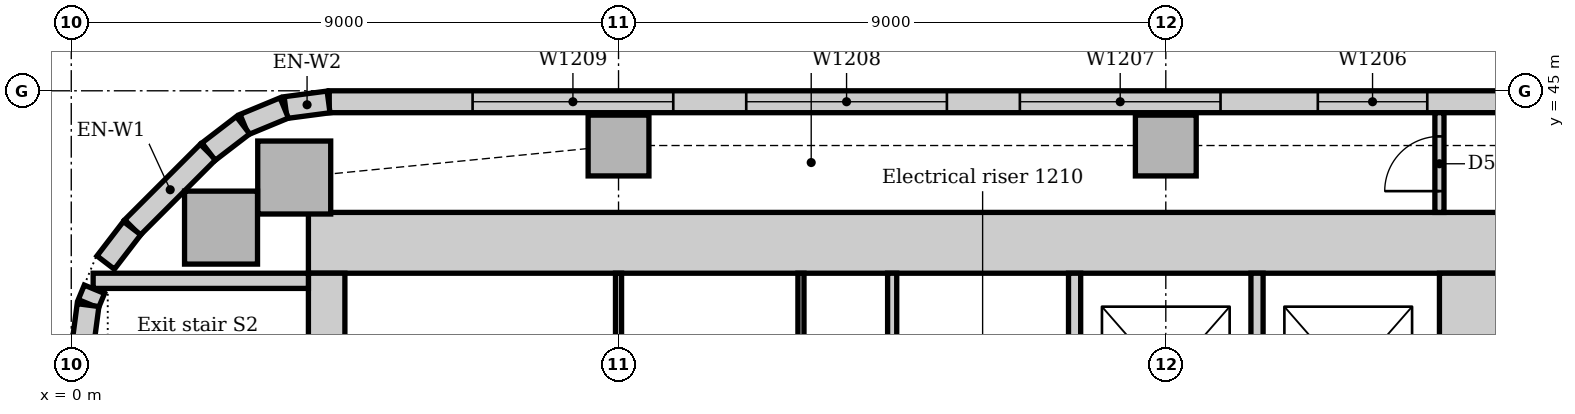
"""IFC4 building model, lengths in metres.
Left out: names, types, materials, properties, quantities, classifications, styles, units other than length and angle.
Written with IfcOpenShell. Run it as: python <this file> out.ifc"""

import sys

from ifc_helpers import new_model, si_unit, direction, frame, frame_2d, origin, origin_2d, place, context, subcontext, project, spatial, rectangle, extrude, element, fill, save


model = new_model("IFC4")
c1 = context("Model", 3, precision=1e-05, world=origin(), true_north=direction((0.0, 1.0)))
c2 = subcontext(c1, "Body", "Model", "MODEL_VIEW")
j1 = project(units=[si_unit("LENGTHUNIT", "METRE"), si_unit("PLANEANGLEUNIT", "RADIAN")], contexts=[c1])
p1 = place(None, origin())
s1 = spatial("IfcSite", under=j1, at=p1, CompositionType="ELEMENT")
p2 = place(p1, origin())
s2 = spatial("IfcBuilding", under=s1, at=p2, CompositionType="ELEMENT")
p3 = place(p2, frame((0.0, 0.0, 55.0)))
s3 = spatial("IfcBuildingStorey", under=s2, at=p3, CompositionType="ELEMENT", Elevation=55.0)
p4 = place(p3, frame((23.5, 42.5, 0.0), z_axis=(0.0, 0.0, 1.0), x_axis=(-1.0, 0.0, 0.0)))
e1 = element("IfcWall", 1, at=p4, inside=s3, PredefinedType="SOLIDWALL", context=c2, shape_type="SweptSolid", body=[
    extrude(rectangle(XDim=19.6, YDim=1.0, at=frame_2d((9.8, 0.0))), origin(), (0.0, 0.0, 1.0), 4.0),
])
p5 = place(p3, frame((23.0, 31.5, 0.0), z_axis=(0.0, 0.0, 1.0), x_axis=(0.0, 1.0, 0.0)))
e2 = element("IfcWall", 2, at=p5, inside=s3, PredefinedType="SOLIDWALL", context=c2, shape_type="SweptSolid", body=[
    extrude(rectangle(XDim=10.5, YDim=1.0, at=frame_2d((5.25, 0.0))), origin(), (0.0, 0.0, 1.0), 4.0),
])
p6 = place(p5, frame((3.15, 0.0, 0.0)))
e3 = element("IfcOpeningElement", 3, at=p6, cuts=e2, PredefinedType="OPENING", context=c2, shape_type="SweptSolid", body=[
    extrude(rectangle(XDim=1.0, YDim=2.1, at=frame_2d((0.5, 1.05))), frame((0.0, 0.51, 0.0), z_axis=(0.0, -1.0, 0.0), x_axis=(1.0, 0.0, 0.0)), (0.0, 0.0, 1.0), 1.02),
])
p7 = place(p5, frame((5.2, 0.0, 0.0)))
e4 = element("IfcOpeningElement", 4, at=p7, cuts=e2, PredefinedType="OPENING", context=c2, shape_type="SweptSolid", body=[
    extrude(rectangle(XDim=1.0, YDim=2.1, at=frame_2d((0.5, 1.05))), frame((0.0, 0.51, 0.0), z_axis=(0.0, -1.0, 0.0), x_axis=(1.0, 0.0, 0.0)), (0.0, 0.0, 1.0), 1.02),
])
p8 = place(p3, frame((4.2, 42.0, 0.0), z_axis=(0.0, 0.0, 1.0), x_axis=(0.0, -1.0, 0.0)))
e5 = element("IfcWall", 5, at=p8, inside=s3, PredefinedType="SOLIDWALL", context=c2, shape_type="SweptSolid", body=[
    extrude(rectangle(XDim=10.5, YDim=0.6, at=frame_2d((5.25, 0.0))), origin(), (0.0, 0.0, 1.0), 4.0),
])
p9 = place(p8, frame((5.3, 0.0, 0.0)))
e6 = element("IfcOpeningElement", 6, at=p9, cuts=e5, PredefinedType="OPENING", context=c2, shape_type="SweptSolid", body=[
    extrude(rectangle(XDim=1.0, YDim=2.1, at=frame_2d((0.5, 1.05))), frame((0.0, 0.31, 0.0), z_axis=(0.0, -1.0, 0.0), x_axis=(1.0, 0.0, 0.0)), (0.0, 0.0, 1.0), 0.62),
])
p10 = place(p3, frame((3.9, 41.875, 0.0), z_axis=(0.0, 0.0, 1.0), x_axis=(-1.0, 0.0, 0.0)))
e7 = element("IfcWall", 7, at=p10, inside=s3, PredefinedType="SOLIDWALL", context=c2, shape_type="SweptSolid", body=[
    extrude(rectangle(XDim=3.54, YDim=0.25, at=frame_2d((1.77, 0.0))), origin(), (0.0, 0.0, 1.0), 4.0),
])
for number, where, z_axis, x_axis in (
    (8, (3.667, 43.574, 0.0), (0.0, 0.0, 1.0), (1.0, 0.0, 0.0)),
    (9, (2.463, 42.75, 0.0), (0.0, 0.0, 1.0), (1.0, 0.0, 0.0)),
):
    element("IfcColumn", number, at=place(p3, frame(where, z_axis=z_axis, x_axis=x_axis)), inside=s3, PredefinedType="COLUMN", context=c2, shape_type="SweptSolid", body=[
        extrude(rectangle(XDim=1.2, YDim=1.2, at=origin_2d()), origin(), (0.0, 0.0, 1.0), 3.85),
    ])
for number, where, z_axis, x_axis in (
    (10, (9.0, 44.1, 0.0), (0.0, 0.0, 1.0), (1.0, 0.0, 0.0)),
    (11, (18.0, 44.1, 0.0), (0.0, 0.0, 1.0), (1.0, 0.0, 0.0)),
):
    element("IfcColumn", number, at=place(p3, frame(where, z_axis=z_axis, x_axis=x_axis)), inside=s3, PredefinedType="COLUMN", context=c2, shape_type="SweptSolid", body=[
        extrude(rectangle(XDim=1.0, YDim=1.0, at=origin_2d()), origin(), (0.0, 0.0, 1.0), 3.85),
    ])
p11 = place(p3, frame((48.257, 44.82, 0.0), z_axis=(0.0, 0.0, 1.0), x_axis=(-1.0, 0.0, 0.0)))
e12 = element("IfcWall", 12, at=p11, inside=s3, PredefinedType="STANDARD", context=c2, shape_type="SweptSolid", body=[
    extrude(rectangle(XDim=44.015, YDim=0.36, at=frame_2d((22.007, 0.0))), origin(), (0.0, 0.0, 1.0), 3.85),
])
p12 = place(p11, frame((2.057, 0.0, 0.9)))
e13 = element("IfcOpeningElement", 13, at=p12, cuts=e12, PredefinedType="OPENING", context=c2, shape_type="SweptSolid", body=[
    extrude(rectangle(XDim=3.3, YDim=1.6, at=frame_2d((1.65, 0.8))), frame((0.0, 0.19, 0.0), z_axis=(0.0, -1.0, 0.0), x_axis=(1.0, 0.0, 0.0)), (0.0, 0.0, 1.0), 0.38),
])
p13 = place(p11, frame((6.857, 0.0, 0.9)))
e14 = element("IfcOpeningElement", 14, at=p13, cuts=e12, PredefinedType="OPENING", context=c2, shape_type="SweptSolid", body=[
    extrude(rectangle(XDim=3.3, YDim=1.6, at=frame_2d((1.65, 0.8))), frame((0.0, 0.19, 0.0), z_axis=(0.0, -1.0, 0.0), x_axis=(1.0, 0.0, 0.0)), (0.0, 0.0, 1.0), 0.38),
])
p14 = place(p11, frame((11.357, 0.0, 0.9)))
e15 = element("IfcOpeningElement", 15, at=p14, cuts=e12, PredefinedType="OPENING", context=c2, shape_type="SweptSolid", body=[
    extrude(rectangle(XDim=3.3, YDim=1.6, at=frame_2d((1.65, 0.8))), frame((0.0, 0.19, 0.0), z_axis=(0.0, -1.0, 0.0), x_axis=(1.0, 0.0, 0.0)), (0.0, 0.0, 1.0), 0.38),
])
p15 = place(p11, frame((15.857, 0.0, 0.9)))
e16 = element("IfcOpeningElement", 16, at=p15, cuts=e12, PredefinedType="OPENING", context=c2, shape_type="SweptSolid", body=[
    extrude(rectangle(XDim=3.3, YDim=1.6, at=frame_2d((1.65, 0.8))), frame((0.0, 0.19, 0.0), z_axis=(0.0, -1.0, 0.0), x_axis=(1.0, 0.0, 0.0)), (0.0, 0.0, 1.0), 0.38),
])
p16 = place(p11, frame((20.357, 0.0, 0.9)))
e17 = element("IfcOpeningElement", 17, at=p16, cuts=e12, PredefinedType="OPENING", context=c2, shape_type="SweptSolid", body=[
    extrude(rectangle(XDim=3.3, YDim=1.6, at=frame_2d((1.65, 0.8))), frame((0.0, 0.19, 0.0), z_axis=(0.0, -1.0, 0.0), x_axis=(1.0, 0.0, 0.0)), (0.0, 0.0, 1.0), 0.38),
])
p17 = place(p11, frame((25.957, 0.0, 0.9)))
e18 = element("IfcOpeningElement", 18, at=p17, cuts=e12, PredefinedType="OPENING", context=c2, shape_type="SweptSolid", body=[
    extrude(rectangle(XDim=1.8, YDim=1.6, at=frame_2d((0.9, 0.8))), frame((0.0, 0.19, 0.0), z_axis=(0.0, -1.0, 0.0), x_axis=(1.0, 0.0, 0.0)), (0.0, 0.0, 1.0), 0.38),
])
p18 = place(p11, frame((29.357, 0.0, 0.9)))
e19 = element("IfcOpeningElement", 19, at=p18, cuts=e12, PredefinedType="OPENING", context=c2, shape_type="SweptSolid", body=[
    extrude(rectangle(XDim=3.3, YDim=1.6, at=frame_2d((1.65, 0.8))), frame((0.0, 0.19, 0.0), z_axis=(0.0, -1.0, 0.0), x_axis=(1.0, 0.0, 0.0)), (0.0, 0.0, 1.0), 0.38),
])
p19 = place(p11, frame((33.857, 0.0, 0.9)))
e20 = element("IfcOpeningElement", 20, at=p19, cuts=e12, PredefinedType="OPENING", context=c2, shape_type="SweptSolid", body=[
    extrude(rectangle(XDim=3.3, YDim=1.6, at=frame_2d((1.65, 0.8))), frame((0.0, 0.19, 0.0), z_axis=(0.0, -1.0, 0.0), x_axis=(1.0, 0.0, 0.0)), (0.0, 0.0, 1.0), 0.38),
])
p20 = place(p11, frame((38.357, 0.0, 0.9)))
e21 = element("IfcOpeningElement", 21, at=p20, cuts=e12, PredefinedType="OPENING", context=c2, shape_type="SweptSolid", body=[
    extrude(rectangle(XDim=3.3, YDim=1.6, at=frame_2d((1.65, 0.8))), frame((0.0, 0.19, 0.0), z_axis=(0.0, -1.0, 0.0), x_axis=(1.0, 0.0, 0.0)), (0.0, 0.0, 1.0), 0.38),
])
p21 = place(p3, frame((2.249, 43.994, 0.0), z_axis=(0.0, 0.0, 1.0), x_axis=(-0.707106781187, -0.707106781187, 0.0)))
e22 = element("IfcWall", 22, at=p21, inside=s3, PredefinedType="STANDARD", context=c2, shape_type="SweptSolid", body=[
    extrude(rectangle(XDim=1.757, YDim=0.36, at=frame_2d((0.879, 0.0))), origin(), (0.0, 0.0, 1.0), 3.85),
])
for number, where, z_axis, x_axis in (
    (23, (4.231, 44.817, 0.0), (0.0, 0.0, 1.0), (-0.991, -0.131, 0.0)),
    (24, (3.503, 44.718, 0.0), (0.0, 0.0, 1.0), (-0.924, -0.383, 0.0)),
):
    element("IfcWall", number, at=place(p3, frame(where, z_axis=z_axis, x_axis=x_axis)), inside=s3, PredefinedType="STANDARD", context=c2, shape_type="SweptSolid", body=[
        extrude(rectangle(XDim=0.713, YDim=0.36, at=frame_2d((0.356, 0.0))), origin(), (0.0, 0.0, 1.0), 3.85),
    ])
for number, where, z_axis, x_axis in (
    (25, (2.825, 44.434, 0.0), (0.0, 0.0, 1.0), (-0.793, -0.609, 0.0)),
    (26, (1.0, 42.741, 0.0), (0.0, 0.0, 1.0), (-0.609, -0.793, 0.0)),
):
    element("IfcWall", number, at=place(p3, frame(where, z_axis=z_axis, x_axis=x_axis)), inside=s3, PredefinedType="STANDARD", context=c2, shape_type="SweptSolid", body=[
        extrude(rectangle(XDim=0.713, YDim=0.36, at=frame_2d((0.357, 0.0))), origin(), (0.0, 0.0, 1.0), 3.85),
    ])
p22 = place(p3, frame((0.381, 41.736, 0.0), z_axis=(0.0, 0.0, 1.0), x_axis=(-0.382773360986, -0.923842277729, 0.0)))
e27 = element("IfcWall", 27, at=p22, inside=s3, PredefinedType="STANDARD", context=c2, shape_type="SweptSolid", body=[
    extrude(rectangle(XDim=0.258, YDim=0.36, at=frame_2d((0.129, 0.0))), origin(), (0.0, 0.0, 1.0), 3.85),
])
p23 = place(p3, frame((0.276, 41.476, 0.0), z_axis=(0.0, 0.0, 1.0), x_axis=(-0.13055608231, -0.99144092581, 0.0)))
e28 = element("IfcWall", 28, at=p23, inside=s3, PredefinedType="STANDARD", context=c2, shape_type="SweptSolid", body=[
    extrude(rectangle(XDim=0.713, YDim=0.36, at=frame_2d((0.356, 0.0))), origin(), (0.0, 0.0, 1.0), 3.85),
])
for number, where, z_axis, x_axis in (
    (29, (16.5, 38.6, 0.0), (0.0, 0.0, 1.0), (0.0, 1.0, 0.0)),
    (30, (19.5, 38.6, 0.0), (0.0, 0.0, 1.0), (0.0, 1.0, 0.0)),
):
    element("IfcWall", number, at=place(p3, frame(where, z_axis=z_axis, x_axis=x_axis)), inside=s3, PredefinedType="PARTITIONING", context=c2, shape_type="SweptSolid", body=[
        extrude(rectangle(XDim=3.4, YDim=0.2, at=frame_2d((1.7, 0.0))), origin(), (0.0, 0.0, 1.0), 3.85),
    ])
p24 = place(p3, frame((22.5, 43.0, 0.0), z_axis=(0.0, 0.0, 1.0), x_axis=(0.0, 1.0, 0.0)))
e31 = element("IfcWall", 31, at=p24, inside=s3, PredefinedType="PARTITIONING", context=c2, shape_type="SweptSolid", body=[
    extrude(rectangle(XDim=1.64, YDim=0.15, at=frame_2d((0.82, 0.0))), origin(), (0.0, 0.0, 1.0), 3.85),
])
p25 = place(p24, frame((0.35, 0.0, 0.0)))
e32 = element("IfcOpeningElement", 32, at=p25, cuts=e31, PredefinedType="OPENING", context=c2, shape_type="SweptSolid", body=[
    extrude(rectangle(XDim=0.9, YDim=2.1, at=frame_2d((0.45, 1.05))), frame((0.0, 0.085, 0.0), z_axis=(0.0, -1.0, 0.0), x_axis=(1.0, 0.0, 0.0)), (0.0, 0.0, 1.0), 0.17),
])
p26 = place(p3, frame((13.5, 38.575, 0.0), z_axis=(0.0, 0.0, 1.0), x_axis=(0.0, 1.0, 0.0)))
e33 = element("IfcWall", 33, at=p26, inside=s3, PredefinedType="PARTITIONING", context=c2, shape_type="SweptSolid", body=[
    extrude(rectangle(XDim=3.425, YDim=0.15, at=frame_2d((1.712, 0.0))), origin(), (0.0, 0.0, 1.0), 3.85),
])
for number, where, z_axis, x_axis in (
    (34, (9.0, 38.575, 0.0), (0.0, 0.0, 1.0), (0.0, 1.0, 0.0)),
    (35, (12.0, 38.575, 0.0), (0.0, 0.0, 1.0), (0.0, 1.0, 0.0)),
):
    element("IfcWall", number, at=place(p3, frame(where, z_axis=z_axis, x_axis=x_axis)), inside=s3, PredefinedType="PARTITIONING", context=c2, shape_type="SweptSolid", body=[
        extrude(rectangle(XDim=3.425, YDim=0.1, at=frame_2d((1.712, 0.0))), origin(), (0.0, 0.0, 1.0), 3.85),
    ])
p27 = place(p17, origin())
e36 = element("IfcWindow", 36, at=p27, inside=s3, PartitioningType="SINGLE_PANEL", PredefinedType="WINDOW", context=c2, shape_type="SweptSolid", body=[
    extrude(rectangle(XDim=1.8, YDim=1.6, at=frame_2d((0.9, 0.8))), frame((0.0, 0.13, 0.0), z_axis=(0.0, -1.0, 0.0), x_axis=(1.0, 0.0, 0.0)), (0.0, 0.0, 1.0), 0.06),
])
fill(e18, e36)
p28 = place(p18, origin())
e37 = element("IfcWindow", 37, at=p28, inside=s3, PartitioningType="SINGLE_PANEL", PredefinedType="WINDOW", context=c2, shape_type="SweptSolid", body=[
    extrude(rectangle(XDim=3.3, YDim=1.6, at=frame_2d((1.65, 0.8))), frame((0.0, 0.13, 0.0), z_axis=(0.0, -1.0, 0.0), x_axis=(1.0, 0.0, 0.0)), (0.0, 0.0, 1.0), 0.06),
])
fill(e19, e37)
p29 = place(p19, origin())
e38 = element("IfcWindow", 38, at=p29, inside=s3, PartitioningType="SINGLE_PANEL", PredefinedType="WINDOW", context=c2, shape_type="SweptSolid", body=[
    extrude(rectangle(XDim=3.3, YDim=1.6, at=frame_2d((1.65, 0.8))), frame((0.0, 0.13, 0.0), z_axis=(0.0, -1.0, 0.0), x_axis=(1.0, 0.0, 0.0)), (0.0, 0.0, 1.0), 0.06),
])
fill(e20, e38)
p30 = place(p20, origin())
e39 = element("IfcWindow", 39, at=p30, inside=s3, PartitioningType="SINGLE_PANEL", PredefinedType="WINDOW", context=c2, shape_type="SweptSolid", body=[
    extrude(rectangle(XDim=3.3, YDim=1.6, at=frame_2d((1.65, 0.8))), frame((0.0, 0.13, 0.0), z_axis=(0.0, -1.0, 0.0), x_axis=(1.0, 0.0, 0.0)), (0.0, 0.0, 1.0), 0.06),
])
fill(e21, e39)
p31 = place(p25, origin())
e40 = element("IfcDoor", 40, at=p31, inside=s3, OperationType="SINGLE_SWING_LEFT", PredefinedType="DOOR", context=c2, shape_type="SweptSolid", body=[
    extrude(rectangle(XDim=0.9, YDim=2.1, at=frame_2d((0.45, 1.05))), frame((0.0, 0.025, 0.0), z_axis=(0.0, -1.0, 0.0), x_axis=(1.0, 0.0, 0.0)), (0.0, 0.0, 1.0), 0.05),
])
fill(e32, e40)
save(model, sys.argv[1])
